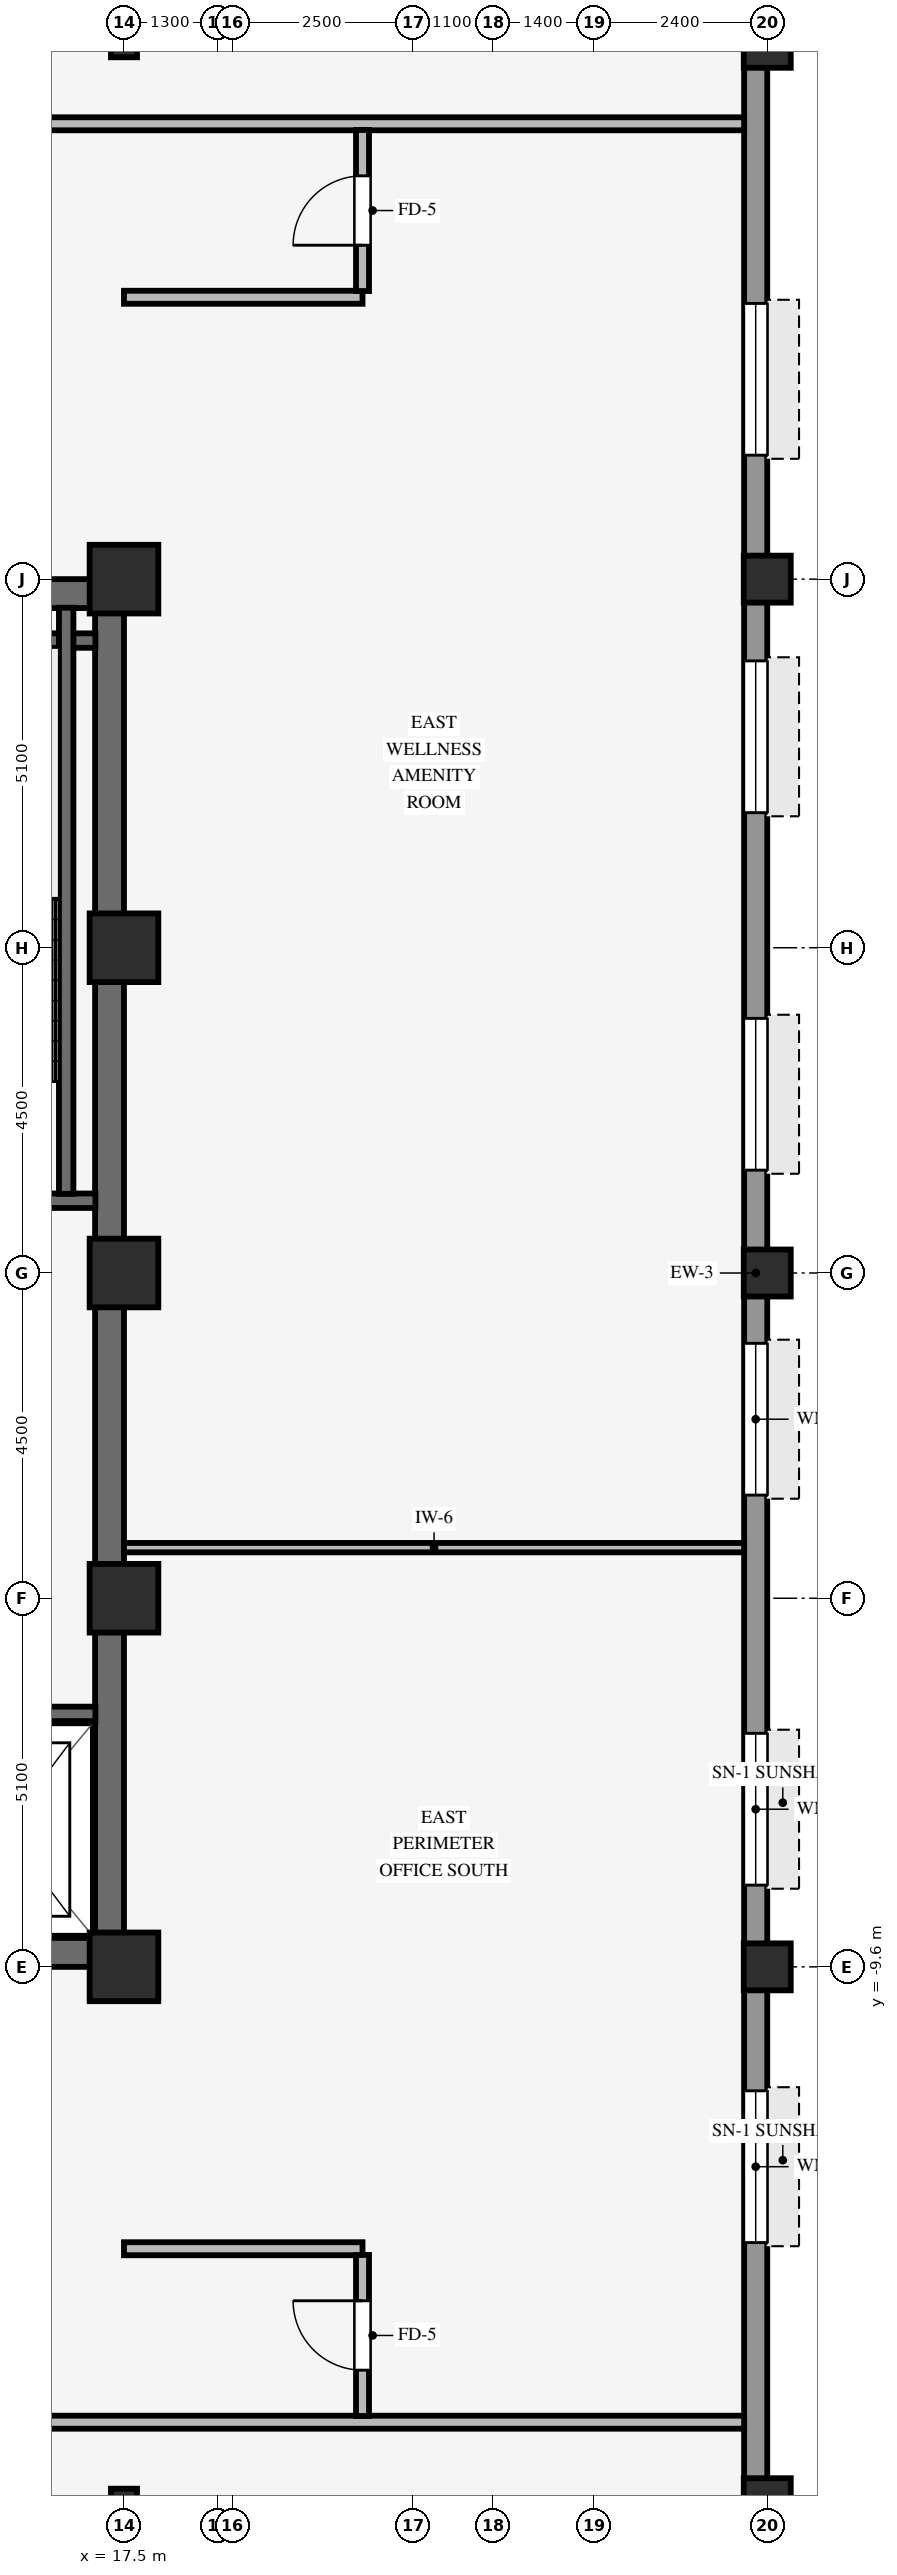
"""IFC4 building model, lengths in metres.
Left out: names, types, materials, properties, quantities, classifications, styles, units other than length and angle.
Written with IfcOpenShell. Run it as: python <this file> out.ifc"""

import sys

from ifc_helpers import new_model, si_unit, direction, frame, frame_2d, origin, origin_2d, place, context, subcontext, project, spatial, rectangle, hollow_rectangle, i_section, extrude, source, transform, mapped, element, fill, save


model = new_model("IFC4")
c1 = context("Model", 3, precision=1e-05, world=origin(), true_north=direction((0.0, 1.0)))
c2 = subcontext(c1, "Body", "Model", "MODEL_VIEW")
j1 = project(units=[si_unit("LENGTHUNIT", "METRE"), si_unit("PLANEANGLEUNIT", "RADIAN")], contexts=[c1])
p1 = place(None, origin())
s1 = spatial("IfcSite", under=j1, at=p1, CompositionType="ELEMENT")
p2 = place(p1, origin())
s2 = spatial("IfcBuilding", under=s1, at=p2, CompositionType="ELEMENT")
p3 = place(p2, frame((0.0, 0.0, 127.5)))
s3 = spatial("IfcBuildingStorey", under=s2, at=p3, CompositionType="ELEMENT", Elevation=127.5)
for number, where, z_axis, x_axis in (
    (1, (9.0, -9.4, 0.0), (0.0, 0.0, 1.0), (1.0, 0.0, 0.0)),
    (2, (9.0, 9.4, 0.0), (0.0, 0.0, 1.0), (1.0, 0.0, 0.0)),
):
    element("IfcWall", number, at=place(p3, frame(where, z_axis=z_axis, x_axis=x_axis)), inside=s3, PredefinedType="SHEAR", context=c2, shape_type="SweptSolid", body=[
        extrude(rectangle(XDim=8.5, YDim=0.4, at=frame_2d((4.25, 0.0))), origin(), (0.0, 0.0, 1.0), 3.37),
    ])
p4 = place(p3, frame((17.3, -9.205, 0.0), z_axis=(0.0, 0.0, 1.0), x_axis=(0.0, 1.0, 0.0)))
e3 = element("IfcWall", 3, at=p4, inside=s3, PredefinedType="SHEAR", context=c2, shape_type="SweptSolid", body=[
    extrude(rectangle(XDim=18.41, YDim=0.4, at=frame_2d((9.205, 0.0))), origin(), (0.0, 0.0, 1.0), 3.37),
])
for number, where, z_axis, x_axis in (
    (4, (17.5, -9.6, 0.0), (0.0, 0.0, 1.0), (1.0, 0.0, 0.0)),
    (5, (17.5, -4.5, 0.0), (0.0, 0.0, 1.0), (1.0, 0.0, 0.0)),
    (6, (17.5, 4.5, 0.0), (0.0, 0.0, 1.0), (1.0, 0.0, 0.0)),
    (7, (17.5, 9.6, 0.0), (0.0, 0.0, 1.0), (1.0, 0.0, 0.0)),
    (8, (17.5, 0.0, 0.0), (0.0, 0.0, 1.0), (1.0, 0.0, 0.0)),
):
    element("IfcColumn", number, at=place(p3, frame(where, z_axis=z_axis, x_axis=x_axis)), inside=s3, PredefinedType="COLUMN", context=c2, shape_type="SweptSolid", body=[
        extrude(rectangle(XDim=0.95, YDim=0.95, at=origin_2d()), origin(), (0.0, 0.0, 1.0), 3.37),
    ])
for number, where, z_axis, x_axis in (
    (9, (26.4, -17.0, 0.0), (0.0, 0.0, 1.0), (1.0, 0.0, 0.0)),
    (10, (26.4, -9.6, 0.0), (0.0, 0.0, 1.0), (1.0, 0.0, 0.0)),
    (11, (26.4, 0.0, 0.0), (0.0, 0.0, 1.0), (1.0, 0.0, 0.0)),
    (12, (26.4, 9.6, 0.0), (0.0, 0.0, 1.0), (1.0, 0.0, 0.0)),
    (13, (26.4, 17.0, 0.0), (0.0, 0.0, 1.0), (1.0, 0.0, 0.0)),
):
    element("IfcColumn", number, at=place(p3, frame(where, z_axis=z_axis, x_axis=x_axis)), inside=s3, PredefinedType="COLUMN", context=c2, shape_type="SweptSolid", body=[
        extrude(hollow_rectangle(XDim=0.65, YDim=0.65, WallThickness=0.04, InnerFilletRadius=0.04, OuterFilletRadius=0.08, at=origin_2d()), origin(), (0.0, 0.0, 1.0), 3.37),
    ])
for number, where, z_axis, x_axis in (
    (14, (17.5, -17.0, 0.0), (0.0, 0.0, 1.0), (1.0, 0.0, 0.0)),
    (15, (17.5, 17.0, 0.0), (0.0, 0.0, 1.0), (1.0, 0.0, 0.0)),
):
    element("IfcColumn", number, at=place(p3, frame(where, z_axis=z_axis, x_axis=x_axis)), inside=s3, PredefinedType="COLUMN", context=c2, shape_type="SweptSolid", body=[
        extrude(i_section(OverallWidth=0.36, OverallDepth=0.36, WebThickness=0.021, FlangeThickness=0.021, FilletRadius=0.018, at=origin_2d()), origin(), (0.0, 0.0, 1.0), 3.37),
    ])
p5 = place(p3, frame((26.24, -20.784, 0.0), z_axis=(0.0, 0.0, 1.0), x_axis=(0.0, 1.0, 0.0)))
e16 = element("IfcWall", 16, at=p5, inside=s3, PredefinedType="STANDARD", context=c2, shape_type="SweptSolid", body=[
    extrude(rectangle(XDim=41.568, YDim=0.32, at=frame_2d((20.784, 0.0))), origin(), (0.0, 0.0, 1.0), 2.705),
])
p6 = place(p5, frame((7.369, 0.0, 0.8)))
e17 = element("IfcOpeningElement", 17, at=p6, cuts=e16, PredefinedType="OPENING", context=c2, shape_type="SweptSolid", body=[
    extrude(rectangle(XDim=2.1, YDim=1.56, at=frame_2d((1.05, 0.78))), frame((0.0, 0.17, 0.0), z_axis=(0.0, -1.0, 0.0), x_axis=(1.0, 0.0, 0.0)), (0.0, 0.0, 1.0), 0.34),
])
p7 = place(p5, frame((12.315, 0.0, 0.8)))
e18 = element("IfcOpeningElement", 18, at=p7, cuts=e16, PredefinedType="OPENING", context=c2, shape_type="SweptSolid", body=[
    extrude(rectangle(XDim=2.1, YDim=1.56, at=frame_2d((1.05, 0.78))), frame((0.0, 0.17, 0.0), z_axis=(0.0, -1.0, 0.0), x_axis=(1.0, 0.0, 0.0)), (0.0, 0.0, 1.0), 0.34),
])
p8 = place(p5, frame((17.711, 0.0, 0.8)))
e19 = element("IfcOpeningElement", 19, at=p8, cuts=e16, PredefinedType="OPENING", context=c2, shape_type="SweptSolid", body=[
    extrude(rectangle(XDim=2.1, YDim=1.56, at=frame_2d((1.05, 0.78))), frame((0.0, 0.17, 0.0), z_axis=(0.0, -1.0, 0.0), x_axis=(1.0, 0.0, 0.0)), (0.0, 0.0, 1.0), 0.34),
])
p9 = place(p5, frame((22.207, 0.0, 0.8)))
e20 = element("IfcOpeningElement", 20, at=p9, cuts=e16, PredefinedType="OPENING", context=c2, shape_type="SweptSolid", body=[
    extrude(rectangle(XDim=2.1, YDim=1.56, at=frame_2d((1.05, 0.78))), frame((0.0, 0.17, 0.0), z_axis=(0.0, -1.0, 0.0), x_axis=(1.0, 0.0, 0.0)), (0.0, 0.0, 1.0), 0.34),
])
p10 = place(p5, frame((27.153, 0.0, 0.8)))
e21 = element("IfcOpeningElement", 21, at=p10, cuts=e16, PredefinedType="OPENING", context=c2, shape_type="SweptSolid", body=[
    extrude(rectangle(XDim=2.1, YDim=1.56, at=frame_2d((1.05, 0.78))), frame((0.0, 0.17, 0.0), z_axis=(0.0, -1.0, 0.0), x_axis=(1.0, 0.0, 0.0)), (0.0, 0.0, 1.0), 0.34),
])
p11 = place(p5, frame((32.099, 0.0, 0.8)))
e22 = element("IfcOpeningElement", 22, at=p11, cuts=e16, PredefinedType="OPENING", context=c2, shape_type="SweptSolid", body=[
    extrude(rectangle(XDim=2.1, YDim=1.56, at=frame_2d((1.05, 0.78))), frame((0.0, 0.17, 0.0), z_axis=(0.0, -1.0, 0.0), x_axis=(1.0, 0.0, 0.0)), (0.0, 0.0, 1.0), 0.34),
])
for number, where, z_axis, x_axis in (
    (23, (13.535, 1.0, 0.0), (0.0, 0.0, 1.0), (1.0, 0.0, 0.0)),
    (24, (13.535, 8.75, 0.0), (0.0, 0.0, 1.0), (1.0, 0.0, 0.0)),
):
    element("IfcWall", number, at=place(p3, frame(where, z_axis=z_axis, x_axis=x_axis)), inside=s3, PredefinedType="SHEAR", context=c2, shape_type="SweptSolid", body=[
        extrude(rectangle(XDim=3.57, YDim=0.2, at=frame_2d((1.785, 0.0))), origin(), (0.0, 0.0, 1.0), 3.37),
    ])
p12 = place(p3, frame((16.7, 1.095, 0.0), z_axis=(0.0, 0.0, 1.0), x_axis=(0.0, 1.0, 0.0)))
e25 = element("IfcWall", 25, at=p12, inside=s3, PredefinedType="SHEAR", context=c2, shape_type="SweptSolid", body=[
    extrude(rectangle(XDim=8.11, YDim=0.2, at=frame_2d((4.055, 0.0))), origin(), (0.0, 0.0, 1.0), 3.37),
])
p13 = place(p3, frame((14.645, -6.1, 0.0), z_axis=(0.0, 0.0, 1.0), x_axis=(1.0, 0.0, 0.0)))
e26 = element("IfcWall", 26, at=p13, inside=s3, PredefinedType="SHEAR", context=c2, shape_type="SweptSolid", body=[
    extrude(rectangle(XDim=2.46, YDim=0.2, at=frame_2d((1.23, 0.0))), origin(), (0.0, 0.0, 1.0), 3.37),
])
p14 = place(p3, frame((-26.08, -15.9, 0.0), z_axis=(0.0, 0.0, 1.0), x_axis=(1.0, 0.0, 0.0)))
e27 = element("IfcWall", 27, at=p14, inside=s3, PredefinedType="PARTITIONING", context=c2, shape_type="SweptSolid", body=[
    extrude(rectangle(XDim=52.16, YDim=0.18, at=frame_2d((26.08, 0.0))), origin(), (0.0, 0.0, 1.0), 3.36),
])
p15 = place(p14, frame((14.28, 0.0, 0.0)))
e28 = element("IfcOpeningElement", 28, at=p15, cuts=e27, PredefinedType="OPENING", context=c2, shape_type="SweptSolid", body=[
    extrude(rectangle(XDim=0.96, YDim=2.1, at=frame_2d((0.48, 1.05))), frame((0.0, 0.1, 0.0), z_axis=(0.0, -1.0, 0.0), x_axis=(1.0, 0.0, 0.0)), (0.0, 0.0, 1.0), 0.2),
])
p16 = place(p14, frame((40.5, 0.0, 0.0)))
e29 = element("IfcOpeningElement", 29, at=p16, cuts=e27, PredefinedType="OPENING", context=c2, shape_type="SweptSolid", body=[
    extrude(rectangle(XDim=0.96, YDim=2.1, at=frame_2d((0.48, 1.05))), frame((0.0, 0.1, 0.0), z_axis=(0.0, -1.0, 0.0), x_axis=(1.0, 0.0, 0.0)), (0.0, 0.0, 1.0), 0.2),
])
p17 = place(p3, frame((17.5, -13.5, 0.0), z_axis=(0.0, 0.0, 1.0), x_axis=(1.0, 0.0, 0.0)))
e30 = element("IfcWall", 30, at=p17, inside=s3, PredefinedType="PARTITIONING", context=c2, shape_type="SweptSolid", body=[
    extrude(rectangle(XDim=3.3, YDim=0.18, at=frame_2d((1.65, 0.0))), origin(), (0.0, 0.0, 1.0), 2.998),
])
p18 = place(p3, frame((17.5, -3.8, 0.0), z_axis=(0.0, 0.0, 1.0), x_axis=(1.0, 0.0, 0.0)))
e31 = element("IfcWall", 31, at=p18, inside=s3, PredefinedType="PARTITIONING", context=c2, shape_type="SweptSolid", body=[
    extrude(rectangle(XDim=8.58, YDim=0.13, at=frame_2d((4.29, 0.0))), origin(), (0.0, 0.0, 1.0), 3.36),
])
p19 = place(p3, frame((17.5, 13.5, 0.0), z_axis=(0.0, 0.0, 1.0), x_axis=(1.0, 0.0, 0.0)))
e32 = element("IfcWall", 32, at=p19, inside=s3, PredefinedType="PARTITIONING", context=c2, shape_type="SweptSolid", body=[
    extrude(rectangle(XDim=3.3, YDim=0.18, at=frame_2d((1.65, 0.0))), origin(), (0.0, 0.0, 1.0), 2.998),
])
p20 = place(p3, frame((-26.08, 15.9, 0.0), z_axis=(0.0, 0.0, 1.0), x_axis=(1.0, 0.0, 0.0)))
e33 = element("IfcWall", 33, at=p20, inside=s3, PredefinedType="PARTITIONING", context=c2, shape_type="SweptSolid", body=[
    extrude(rectangle(XDim=52.16, YDim=0.18, at=frame_2d((26.08, 0.0))), origin(), (0.0, 0.0, 1.0), 3.36),
])
p21 = place(p20, frame((18.3, 0.0, 0.0)))
e34 = element("IfcOpeningElement", 34, at=p21, cuts=e33, PredefinedType="OPENING", context=c2, shape_type="SweptSolid", body=[
    extrude(rectangle(XDim=0.96, YDim=2.1, at=frame_2d((0.48, 1.05))), frame((0.0, 0.1, 0.0), z_axis=(0.0, -1.0, 0.0), x_axis=(1.0, 0.0, 0.0)), (0.0, 0.0, 1.0), 0.2),
])
p22 = place(p20, frame((40.5, 0.0, 0.0)))
e35 = element("IfcOpeningElement", 35, at=p22, cuts=e33, PredefinedType="OPENING", context=c2, shape_type="SweptSolid", body=[
    extrude(rectangle(XDim=0.96, YDim=2.1, at=frame_2d((0.48, 1.05))), frame((0.0, 0.1, 0.0), z_axis=(0.0, -1.0, 0.0), x_axis=(1.0, 0.0, 0.0)), (0.0, 0.0, 1.0), 0.2),
])
p23 = place(p3, frame((20.8, -15.814, 0.0), z_axis=(0.0, 0.0, 1.0), x_axis=(0.0, 1.0, 0.0)))
e36 = element("IfcWall", 36, at=p23, inside=s3, PredefinedType="PARTITIONING", context=c2, shape_type="SweptSolid", body=[
    extrude(rectangle(XDim=2.228, YDim=0.18, at=frame_2d((1.114, 0.0))), origin(), (0.0, 0.0, 1.0), 3.36),
])
p24 = place(p23, frame((0.634, 0.0, 0.0)))
e37 = element("IfcOpeningElement", 37, at=p24, cuts=e36, PredefinedType="OPENING", context=c2, shape_type="SweptSolid", body=[
    extrude(rectangle(XDim=0.96, YDim=2.1, at=frame_2d((0.48, 1.05))), frame((0.0, 0.1, 0.0), z_axis=(0.0, -1.0, 0.0), x_axis=(1.0, 0.0, 0.0)), (0.0, 0.0, 1.0), 0.2),
])
p25 = place(p3, frame((20.8, 13.586, 0.0), z_axis=(0.0, 0.0, 1.0), x_axis=(0.0, 1.0, 0.0)))
e38 = element("IfcWall", 38, at=p25, inside=s3, PredefinedType="PARTITIONING", context=c2, shape_type="SweptSolid", body=[
    extrude(rectangle(XDim=2.228, YDim=0.18, at=frame_2d((1.114, 0.0))), origin(), (0.0, 0.0, 1.0), 3.36),
])
p26 = place(p25, frame((0.634, 0.0, 0.0)))
e39 = element("IfcOpeningElement", 39, at=p26, cuts=e38, PredefinedType="OPENING", context=c2, shape_type="SweptSolid", body=[
    extrude(rectangle(XDim=0.96, YDim=2.1, at=frame_2d((0.48, 1.05))), frame((0.0, 0.1, 0.0), z_axis=(0.0, -1.0, 0.0), x_axis=(1.0, 0.0, 0.0)), (0.0, 0.0, 1.0), 0.2),
])
m1 = source(origin(), c2, "Body", "SweptSolid", [
    extrude(rectangle(XDim=2.1, YDim=1.56, at=frame_2d((1.05, 0.78))), frame((0.0, 0.03, 0.0), z_axis=(0.0, -1.0, 0.0), x_axis=(1.0, 0.0, 0.0)), (0.0, 0.0, 1.0), 0.06),
])
p27 = place(p6, origin())
e40 = element("IfcWindow", 40, at=p27, inside=s3, PartitioningType="SINGLE_PANEL", PredefinedType="WINDOW", context=c2, shape_type="MappedRepresentation", body=[
    mapped(m1, transform((0.0, 0.0, 0.0), scale=1.0)),
])
fill(e17, e40)
p28 = place(p7, origin())
e41 = element("IfcWindow", 41, at=p28, inside=s3, PartitioningType="SINGLE_PANEL", PredefinedType="WINDOW", context=c2, shape_type="MappedRepresentation", body=[
    mapped(m1, transform((0.0, 0.0, 0.0), scale=1.0)),
])
fill(e18, e41)
p29 = place(p8, origin())
e42 = element("IfcWindow", 42, at=p29, inside=s3, PartitioningType="SINGLE_PANEL", PredefinedType="WINDOW", context=c2, shape_type="MappedRepresentation", body=[
    mapped(m1, transform((0.0, 0.0, 0.0), scale=1.0)),
])
fill(e19, e42)
p30 = place(p9, origin())
e43 = element("IfcWindow", 43, at=p30, inside=s3, PartitioningType="SINGLE_PANEL", PredefinedType="WINDOW", context=c2, shape_type="MappedRepresentation", body=[
    mapped(m1, transform((0.0, 0.0, 0.0), scale=1.0)),
])
fill(e20, e43)
p31 = place(p10, origin())
e44 = element("IfcWindow", 44, at=p31, inside=s3, PartitioningType="SINGLE_PANEL", PredefinedType="WINDOW", context=c2, shape_type="MappedRepresentation", body=[
    mapped(m1, transform((0.0, 0.0, 0.0), scale=1.0)),
])
fill(e21, e44)
p32 = place(p11, origin())
e45 = element("IfcWindow", 45, at=p32, inside=s3, PartitioningType="SINGLE_PANEL", PredefinedType="WINDOW", context=c2, shape_type="MappedRepresentation", body=[
    mapped(m1, transform((0.0, 0.0, 0.0), scale=1.0)),
])
fill(e22, e45)
m2 = source(origin(), c2, "Body", "SweptSolid", [
    extrude(rectangle(XDim=0.96, YDim=2.1, at=frame_2d((0.48, 1.05))), frame((0.0, 0.025, 0.0), z_axis=(0.0, -1.0, 0.0), x_axis=(1.0, 0.0, 0.0)), (0.0, 0.0, 1.0), 0.05),
])
p33 = place(p24, origin())
e46 = element("IfcDoor", 46, at=p33, inside=s3, OperationType="SINGLE_SWING_RIGHT", PredefinedType="DOOR", context=c2, shape_type="MappedRepresentation", body=[
    mapped(m2, transform((0.0, 0.0, 0.0), scale=1.0)),
])
fill(e37, e46)
p34 = place(p26, origin())
e47 = element("IfcDoor", 47, at=p34, inside=s3, OperationType="SINGLE_SWING_LEFT", PredefinedType="DOOR", context=c2, shape_type="MappedRepresentation", body=[
    mapped(m2, transform((0.0, 0.0, 0.0), scale=1.0)),
])
fill(e39, e47)
save(model, sys.argv[1])
